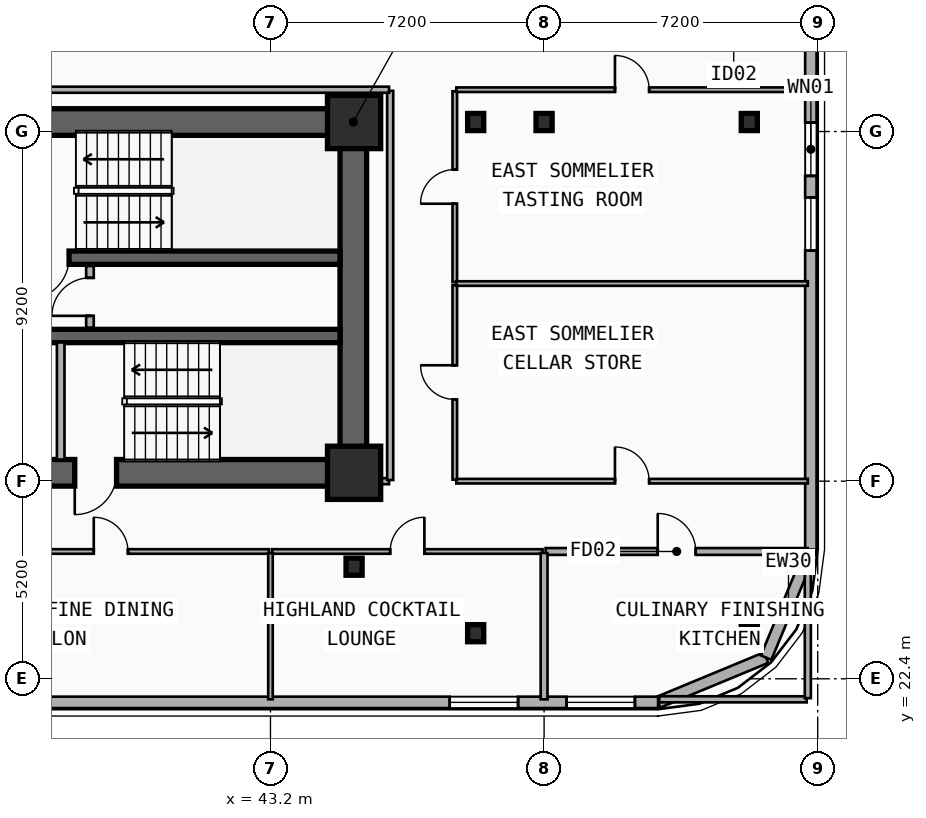
"""IFC4 building model, lengths in metres.
Left out: names, types, materials, properties, quantities, classifications, styles, units other than length and angle.
Written with IfcOpenShell. Run it as: python <this file> out.ifc"""

import sys

from ifc_helpers import new_model, si_unit, direction, frame, frame_2d, origin, origin_2d, place, context, subcontext, project, spatial, rectangle, i_section, extrude, element, fill, save


model = new_model("IFC4")
c1 = context("Model", 3, precision=1e-05, world=origin(), true_north=direction((0.0, 1.0)))
c2 = subcontext(c1, "Body", "Model", "MODEL_VIEW")
j1 = project(units=[si_unit("LENGTHUNIT", "METRE"), si_unit("PLANEANGLEUNIT", "RADIAN")], contexts=[c1])
p1 = place(None, origin())
s1 = spatial("IfcSite", under=j1, at=p1, CompositionType="ELEMENT")
p2 = place(p1, origin())
s2 = spatial("IfcBuilding", under=s1, at=p2, CompositionType="ELEMENT")
p3 = place(p2, frame((0.0, 0.0, 71.0)))
s3 = spatial("IfcBuildingStorey", under=s2, at=p3, CompositionType="ELEMENT", Elevation=71.0)
p4 = place(p3, frame((12.15, 37.05, 0.0), z_axis=(0.0, 0.0, 1.0), x_axis=(1.0, 0.0, 0.0)))
e1 = element("IfcWall", 1, at=p4, inside=s3, PredefinedType="SHEAR", context=c2, shape_type="SweptSolid", body=[
    extrude(rectangle(XDim=33.23, YDim=0.7, at=frame_2d((16.615, 0.0))), origin(), (0.0, 0.0, 1.0), 3.5),
])
p5 = place(p3, frame((45.38, 27.82, 0.0), z_axis=(0.0, 0.0, 1.0), x_axis=(-1.0, 0.0, 0.0)))
e2 = element("IfcWall", 2, at=p5, inside=s3, PredefinedType="SHEAR", context=c2, shape_type="SweptSolid", body=[
    extrude(rectangle(XDim=12.23, YDim=0.7, at=frame_2d((6.115, 0.0))), origin(), (0.0, 0.0, 1.0), 3.5),
])
p6 = place(p5, frame((9.93, 0.0, 0.0)))
e3 = element("IfcOpeningElement", 3, at=p6, cuts=e2, PredefinedType="OPENING", context=c2, shape_type="SweptSolid", body=[
    extrude(rectangle(XDim=1.1, YDim=2.15, at=frame_2d((0.55, 1.075))), frame((0.0, 0.36, 0.0), z_axis=(0.0, -1.0, 0.0), x_axis=(1.0, 0.0, 0.0)), (0.0, 0.0, 1.0), 0.72),
])
p7 = place(p5, frame((6.23, 0.0, 0.0)))
e4 = element("IfcOpeningElement", 4, at=p7, cuts=e2, PredefinedType="OPENING", context=c2, shape_type="SweptSolid", body=[
    extrude(rectangle(XDim=1.1, YDim=2.15, at=frame_2d((0.55, 1.075))), frame((0.0, 0.36, 0.0), z_axis=(0.0, -1.0, 0.0), x_axis=(1.0, 0.0, 0.0)), (0.0, 0.0, 1.0), 0.72),
])
p8 = place(p3, frame((45.38, 28.17, 0.0), z_axis=(0.0, 0.0, 1.0), x_axis=(0.0, 1.0, 0.0)))
e5 = element("IfcWall", 5, at=p8, inside=s3, PredefinedType="SHEAR", context=c2, shape_type="SweptSolid", body=[
    extrude(rectangle(XDim=8.53, YDim=0.7, at=frame_2d((4.265, 0.0))), origin(), (0.0, 0.0, 1.0), 3.5),
])
p9 = place(p3, frame((45.03, 33.48, 0.0), z_axis=(0.0, 0.0, 1.0), x_axis=(-1.0, 0.0, 0.0)))
e6 = element("IfcWall", 6, at=p9, inside=s3, PredefinedType="SHEAR", context=c2, shape_type="SweptSolid", body=[
    extrude(rectangle(XDim=8.475, YDim=0.35, at=frame_2d((4.238, 0.0))), origin(), (0.0, 0.0, 1.0), 3.5),
])
p10 = place(p9, frame((7.13, 0.0, 0.0)))
e7 = element("IfcOpeningElement", 7, at=p10, cuts=e6, PredefinedType="OPENING", context=c2, shape_type="SweptSolid", body=[
    extrude(rectangle(XDim=1.1, YDim=2.15, at=frame_2d((0.55, 1.075))), frame((0.0, 0.185, 0.0), z_axis=(0.0, -1.0, 0.0), x_axis=(1.0, 0.0, 0.0)), (0.0, 0.0, 1.0), 0.37),
])
p11 = place(p3, frame((36.555, 31.42, 0.0), z_axis=(0.0, 0.0, 1.0), x_axis=(1.0, 0.0, 0.0)))
e8 = element("IfcWall", 8, at=p11, inside=s3, PredefinedType="SHEAR", context=c2, shape_type="SweptSolid", body=[
    extrude(rectangle(XDim=8.475, YDim=0.35, at=frame_2d((4.238, 0.0))), origin(), (0.0, 0.0, 1.0), 3.5),
])
for number, where, z_axis, x_axis in (
    (9, (45.4, 27.82, 0.0), (0.0, 0.0, 1.0), (1.0, 0.0, 0.0)),
    (10, (45.4, 37.05, 0.0), (0.0, 0.0, 1.0), (1.0, 0.0, 0.0)),
):
    element("IfcColumn", number, at=place(p3, frame(where, z_axis=z_axis, x_axis=x_axis)), inside=s3, PredefinedType="COLUMN", context=c2, shape_type="SweptSolid", body=[
        extrude(rectangle(XDim=1.4, YDim=1.4, at=origin_2d()), origin(), (0.0, 0.0, 1.0), 3.5),
    ])
for number, where, z_axis, x_axis in (
    (11, (45.4, 25.35, 0.0), (0.0, 0.0, 1.0), (1.0, 0.0, 0.0)),
    (12, (48.6, 23.6, 0.0), (0.0, 0.0, 1.0), (1.0, 0.0, 0.0)),
    (13, (48.6, 37.05, 0.0), (0.0, 0.0, 1.0), (1.0, 0.0, 0.0)),
    (14, (50.4, 37.05, 0.0), (0.0, 0.0, 1.0), (1.0, 0.0, 0.0)),
    (15, (55.8, 23.6, 0.0), (0.0, 0.0, 1.0), (1.0, 0.0, 0.0)),
    (16, (55.8, 37.05, 0.0), (0.0, 0.0, 1.0), (1.0, 0.0, 0.0)),
):
    element("IfcColumn", number, at=place(p3, frame(where, z_axis=z_axis, x_axis=x_axis)), inside=s3, PredefinedType="COLUMN", context=c2, shape_type="SweptSolid", body=[
        extrude(i_section(OverallWidth=0.424, OverallDepth=0.45, WebThickness=0.041, FlangeThickness=0.065, FilletRadius=0.015, at=origin_2d()), origin(), (0.0, 0.0, 1.0), 3.5),
    ])
p12 = place(p3, frame((56.243, 22.958, 0.0), z_axis=(0.0, 0.0, 1.0), x_axis=(-0.923882414032, -0.382676475685, 0.0)))
e17 = element("IfcWall", 17, at=p12, inside=s3, PredefinedType="SOLIDWALL", context=c2, shape_type="SweptSolid", body=[
    extrude(rectangle(XDim=3.077, YDim=0.3, at=frame_2d((1.539, 0.0))), origin(), (0.0, 0.0, 1.0), 2.66),
])
p13 = place(p3, frame((57.42, 25.8, 0.0), z_axis=(0.0, 0.0, 1.0), x_axis=(-0.382636798336, -0.92389884758, 0.0)))
e18 = element("IfcWall", 18, at=p13, inside=s3, PredefinedType="SOLIDWALL", context=c2, shape_type="SweptSolid", body=[
    extrude(rectangle(XDim=3.077, YDim=0.3, at=frame_2d((1.538, 0.0))), origin(), (0.0, 0.0, 1.0), 3.18),
])
p14 = place(p3, frame((57.42, 41.0, 0.0), z_axis=(0.0, 0.0, 1.0), x_axis=(0.0, -1.0, 0.0)))
e19 = element("IfcWall", 19, at=p14, inside=s3, PredefinedType="SOLIDWALL", context=c2, shape_type="SweptSolid", body=[
    extrude(rectangle(XDim=15.2, YDim=0.3, at=frame_2d((7.6, 0.0))), origin(), (0.0, 0.0, 1.0), 3.18),
])
p15 = place(p14, frame((3.967, 0.0, 0.48)))
e20 = element("IfcOpeningElement", 20, at=p15, cuts=e19, PredefinedType="OPENING", context=c2, shape_type="SweptSolid", body=[
    extrude(rectangle(XDim=1.4, YDim=1.8, at=frame_2d((0.7, 0.9))), frame((0.0, 0.16, 0.0), z_axis=(0.0, -1.0, 0.0), x_axis=(1.0, 0.0, 0.0)), (0.0, 0.0, 1.0), 0.32),
])
p16 = place(p14, frame((5.933, 0.0, 0.48)))
e21 = element("IfcOpeningElement", 21, at=p16, cuts=e19, PredefinedType="OPENING", context=c2, shape_type="SweptSolid", body=[
    extrude(rectangle(XDim=1.4, YDim=1.8, at=frame_2d((0.7, 0.9))), frame((0.0, 0.16, 0.0), z_axis=(0.0, -1.0, 0.0), x_axis=(1.0, 0.0, 0.0)), (0.0, 0.0, 1.0), 0.32),
])
p17 = place(p3, frame((53.4, 21.78, 0.0), z_axis=(0.0, 0.0, 1.0), x_axis=(-1.0, 0.0, 0.0)))
e22 = element("IfcWall", 22, at=p17, inside=s3, PredefinedType="SOLIDWALL", context=c2, shape_type="SweptSolid", body=[
    extrude(rectangle(XDim=49.2, YDim=0.3, at=frame_2d((24.6, 0.0))), origin(), (0.0, 0.0, 1.0), 2.66),
])
p18 = place(p17, frame((47.08, 0.0, 0.68)))
e23 = element("IfcOpeningElement", 23, at=p18, cuts=e22, PredefinedType="OPENING", context=c2, shape_type="SweptSolid", body=[
    extrude(rectangle(XDim=1.8, YDim=1.8, at=frame_2d((0.9, 0.9))), frame((0.0, 0.16, 0.0), z_axis=(0.0, -1.0, 0.0), x_axis=(1.0, 0.0, 0.0)), (0.0, 0.0, 1.0), 0.32),
])
p19 = place(p17, frame((42.3, 0.0, 0.68)))
e24 = element("IfcOpeningElement", 24, at=p19, cuts=e22, PredefinedType="OPENING", context=c2, shape_type="SweptSolid", body=[
    extrude(rectangle(XDim=1.8, YDim=1.8, at=frame_2d((0.9, 0.9))), frame((0.0, 0.16, 0.0), z_axis=(0.0, -1.0, 0.0), x_axis=(1.0, 0.0, 0.0)), (0.0, 0.0, 1.0), 0.32),
])
p20 = place(p17, frame((30.9, 0.0, 0.48)))
e25 = element("IfcOpeningElement", 25, at=p20, cuts=e22, PredefinedType="OPENING", context=c2, shape_type="SweptSolid", body=[
    extrude(rectangle(XDim=1.2, YDim=1.5, at=frame_2d((0.6, 0.75))), frame((0.0, 0.16, 0.0), z_axis=(0.0, -1.0, 0.0), x_axis=(1.0, 0.0, 0.0)), (0.0, 0.0, 1.0), 0.32),
])
p21 = place(p17, frame((17.1, 0.0, 0.48)))
e26 = element("IfcOpeningElement", 26, at=p21, cuts=e22, PredefinedType="OPENING", context=c2, shape_type="SweptSolid", body=[
    extrude(rectangle(XDim=1.2, YDim=1.5, at=frame_2d((0.6, 0.75))), frame((0.0, 0.16, 0.0), z_axis=(0.0, -1.0, 0.0), x_axis=(1.0, 0.0, 0.0)), (0.0, 0.0, 1.0), 0.32),
])
p22 = place(p17, frame((3.684, 0.0, 0.68)))
e27 = element("IfcOpeningElement", 27, at=p22, cuts=e22, PredefinedType="OPENING", context=c2, shape_type="SweptSolid", body=[
    extrude(rectangle(XDim=1.8, YDim=1.8, at=frame_2d((0.9, 0.9))), frame((0.0, 0.16, 0.0), z_axis=(0.0, -1.0, 0.0), x_axis=(1.0, 0.0, 0.0)), (0.0, 0.0, 1.0), 0.32),
])
p23 = place(p17, frame((0.61, 0.0, 0.68)))
e28 = element("IfcOpeningElement", 28, at=p23, cuts=e22, PredefinedType="OPENING", context=c2, shape_type="SweptSolid", body=[
    extrude(rectangle(XDim=1.8, YDim=1.8, at=frame_2d((0.9, 0.9))), frame((0.0, 0.16, 0.0), z_axis=(0.0, -1.0, 0.0), x_axis=(1.0, 0.0, 0.0)), (0.0, 0.0, 1.0), 0.32),
])
p24 = place(p3, frame((37.68, 28.17, 0.0), z_axis=(0.0, 0.0, 1.0), x_axis=(0.0, 1.0, 0.0)))
e29 = element("IfcWall", 29, at=p24, inside=s3, PredefinedType="PARTITIONING", context=c2, shape_type="SweptSolid", body=[
    extrude(rectangle(XDim=3.08, YDim=0.2, at=frame_2d((1.54, 0.0))), origin(), (0.0, 0.0, 1.0), 2.56),
])
p25 = place(p3, frame((38.45, 31.64, 0.0), z_axis=(0.0, 0.0, 1.0), x_axis=(0.0, 1.0, 0.0)))
e30 = element("IfcWall", 30, at=p25, inside=s3, PredefinedType="PARTITIONING", context=c2, shape_type="SweptSolid", body=[
    extrude(rectangle(XDim=1.62, YDim=0.2, at=frame_2d((0.81, 0.0))), origin(), (0.0, 0.0, 1.0), 3.18),
])
p26 = place(p25, frame((0.31, 0.0, 0.0)))
e31 = element("IfcOpeningElement", 31, at=p26, cuts=e30, PredefinedType="OPENING", context=c2, shape_type="SweptSolid", body=[
    extrude(rectangle(XDim=1.0, YDim=2.15, at=frame_2d((0.5, 1.075))), frame((0.0, 0.11, 0.0), z_axis=(0.0, -1.0, 0.0), x_axis=(1.0, 0.0, 0.0)), (0.0, 0.0, 1.0), 0.22),
])
p27 = place(p3, frame((48.09, 27.6, 0.0), z_axis=(0.0, 0.0, 1.0), x_axis=(1.0, 0.0, 0.0)))
e32 = element("IfcWall", 32, at=p27, inside=s3, PredefinedType="PARTITIONING", context=c2, shape_type="SweptSolid", body=[
    extrude(rectangle(XDim=9.25, YDim=0.12, at=frame_2d((4.625, 0.0))), origin(), (0.0, 0.0, 1.0), 2.51),
])
p28 = place(p27, frame((4.175, 0.0, 0.0)))
e33 = element("IfcOpeningElement", 33, at=p28, cuts=e32, PredefinedType="OPENING", context=c2, shape_type="SweptSolid", body=[
    extrude(rectangle(XDim=0.9, YDim=2.1, at=frame_2d((0.45, 1.05))), frame((0.0, 0.07, 0.0), z_axis=(0.0, -1.0, 0.0), x_axis=(1.0, 0.0, 0.0)), (0.0, 0.0, 1.0), 0.14),
])
p29 = place(p3, frame((34.84, 25.75, 0.0), z_axis=(0.0, 0.0, 1.0), x_axis=(1.0, 0.0, 0.0)))
e34 = element("IfcWall", 34, at=p29, inside=s3, PredefinedType="PARTITIONING", context=c2, shape_type="SweptSolid", body=[
    extrude(rectangle(XDim=8.32, YDim=0.12, at=frame_2d((4.16, 0.0))), origin(), (0.0, 0.0, 1.0), 2.25),
])
p30 = place(p29, frame((3.71, 0.0, 0.0)))
e35 = element("IfcOpeningElement", 35, at=p30, cuts=e34, PredefinedType="OPENING", context=c2, shape_type="SweptSolid", body=[
    extrude(rectangle(XDim=0.9, YDim=2.1, at=frame_2d((0.45, 1.05))), frame((0.0, 0.07, 0.0), z_axis=(0.0, -1.0, 0.0), x_axis=(1.0, 0.0, 0.0)), (0.0, 0.0, 1.0), 0.14),
])
p31 = place(p3, frame((43.24, 25.75, 0.0), z_axis=(0.0, 0.0, 1.0), x_axis=(1.0, 0.0, 0.0)))
e36 = element("IfcWall", 36, at=p31, inside=s3, PredefinedType="PARTITIONING", context=c2, shape_type="SweptSolid", body=[
    extrude(rectangle(XDim=7.12, YDim=0.12, at=frame_2d((3.56, 0.0))), origin(), (0.0, 0.0, 1.0), 2.25),
])
p32 = place(p31, frame((3.11, 0.0, 0.0)))
e37 = element("IfcOpeningElement", 37, at=p32, cuts=e36, PredefinedType="OPENING", context=c2, shape_type="SweptSolid", body=[
    extrude(rectangle(XDim=0.9, YDim=2.1, at=frame_2d((0.45, 1.05))), frame((0.0, 0.07, 0.0), z_axis=(0.0, -1.0, 0.0), x_axis=(1.0, 0.0, 0.0)), (0.0, 0.0, 1.0), 0.14),
])
p33 = place(p3, frame((50.44, 25.75, 0.0), z_axis=(0.0, 0.0, 1.0), x_axis=(1.0, 0.0, 0.0)))
e38 = element("IfcWall", 38, at=p33, inside=s3, PredefinedType="PLUMBINGWALL", context=c2, shape_type="SweptSolid", body=[
    extrude(rectangle(XDim=6.9, YDim=0.18, at=frame_2d((3.45, 0.0))), origin(), (0.0, 0.0, 1.0), 2.51),
])
p34 = place(p33, frame((2.95, 0.0, 0.0)))
e39 = element("IfcOpeningElement", 39, at=p34, cuts=e38, PredefinedType="OPENING", context=c2, shape_type="SweptSolid", body=[
    extrude(rectangle(XDim=1.0, YDim=2.15, at=frame_2d((0.5, 1.075))), frame((0.0, 0.1, 0.0), z_axis=(0.0, -1.0, 0.0), x_axis=(1.0, 0.0, 0.0)), (0.0, 0.0, 1.0), 0.2),
])
p35 = place(p3, frame((48.05, 27.64, 0.0), z_axis=(0.0, 0.0, 1.0), x_axis=(0.0, 1.0, 0.0)))
e40 = element("IfcWall", 40, at=p35, inside=s3, PredefinedType="PARTITIONING", context=c2, shape_type="SweptSolid", body=[
    extrude(rectangle(XDim=5.12, YDim=0.12, at=frame_2d((2.56, 0.0))), origin(), (0.0, 0.0, 1.0), 3.18),
])
p36 = place(p35, frame((2.11, 0.0, 0.0)))
e41 = element("IfcOpeningElement", 41, at=p36, cuts=e40, PredefinedType="OPENING", context=c2, shape_type="SweptSolid", body=[
    extrude(rectangle(XDim=0.9, YDim=2.1, at=frame_2d((0.45, 1.05))), frame((0.0, 0.07, 0.0), z_axis=(0.0, -1.0, 0.0), x_axis=(1.0, 0.0, 0.0)), (0.0, 0.0, 1.0), 0.14),
])
p37 = place(p3, frame((48.05, 32.84, 0.0), z_axis=(0.0, 0.0, 1.0), x_axis=(0.0, 1.0, 0.0)))
e42 = element("IfcWall", 42, at=p37, inside=s3, PredefinedType="PARTITIONING", context=c2, shape_type="SweptSolid", body=[
    extrude(rectangle(XDim=5.02, YDim=0.12, at=frame_2d((2.51, 0.0))), origin(), (0.0, 0.0, 1.0), 2.66),
])
p38 = place(p37, frame((2.06, 0.0, 0.0)))
e43 = element("IfcOpeningElement", 43, at=p38, cuts=e42, PredefinedType="OPENING", context=c2, shape_type="SweptSolid", body=[
    extrude(rectangle(XDim=0.9, YDim=2.1, at=frame_2d((0.45, 1.05))), frame((0.0, 0.07, 0.0), z_axis=(0.0, -1.0, 0.0), x_axis=(1.0, 0.0, 0.0)), (0.0, 0.0, 1.0), 0.14),
])
p39 = place(p3, frame((48.09, 37.9, 0.0), z_axis=(0.0, 0.0, 1.0), x_axis=(1.0, 0.0, 0.0)))
e44 = element("IfcWall", 44, at=p39, inside=s3, PredefinedType="PARTITIONING", context=c2, shape_type="SweptSolid", body=[
    extrude(rectangle(XDim=9.25, YDim=0.12, at=frame_2d((4.625, 0.0))), origin(), (0.0, 0.0, 1.0), 3.18),
])
p40 = place(p39, frame((4.175, 0.0, 0.0)))
e45 = element("IfcOpeningElement", 45, at=p40, cuts=e44, PredefinedType="OPENING", context=c2, shape_type="SweptSolid", body=[
    extrude(rectangle(XDim=0.9, YDim=2.1, at=frame_2d((0.45, 1.05))), frame((0.0, 0.07, 0.0), z_axis=(0.0, -1.0, 0.0), x_axis=(1.0, 0.0, 0.0)), (0.0, 0.0, 1.0), 0.14),
])
p41 = place(p3, frame((48.09, 32.8, 0.0), z_axis=(0.0, 0.0, 1.0), x_axis=(1.0, 0.0, 0.0)))
e46 = element("IfcWall", 46, at=p41, inside=s3, PredefinedType="PARTITIONING", context=c2, shape_type="SweptSolid", body=[
    extrude(rectangle(XDim=9.25, YDim=0.12, at=frame_2d((4.625, 0.0))), origin(), (0.0, 0.0, 1.0), 2.51),
])
p42 = place(p3, frame((43.2, 21.86, 0.0), z_axis=(0.0, 0.0, 1.0), x_axis=(0.0, 1.0, 0.0)))
e47 = element("IfcWall", 47, at=p42, inside=s3, PredefinedType="PARTITIONING", context=c2, shape_type="SweptSolid", body=[
    extrude(rectangle(XDim=3.85, YDim=0.12, at=frame_2d((1.925, 0.0))), origin(), (0.0, 0.0, 1.0), 2.72),
])
p43 = place(p3, frame((50.4, 21.86, 0.0), z_axis=(0.0, 0.0, 1.0), x_axis=(0.0, 1.0, 0.0)))
e48 = element("IfcWall", 48, at=p43, inside=s3, PredefinedType="PLUMBINGWALL", context=c2, shape_type="SweptSolid", body=[
    extrude(rectangle(XDim=3.85, YDim=0.18, at=frame_2d((1.925, 0.0))), origin(), (0.0, 0.0, 1.0), 2.51),
])
p44 = place(p3, frame((45.41, 27.6, 0.0), z_axis=(0.0, 0.0, 1.0), x_axis=(1.0, 0.0, 0.0)))
e49 = element("IfcWall", 49, at=p44, inside=s3, PredefinedType="PARTITIONING", context=c2, shape_type="SweptSolid", body=[
    extrude(rectangle(XDim=0.91, YDim=0.16, at=frame_2d((0.455, 0.0))), origin(), (0.0, 0.0, 1.0), 2.28),
])
p45 = place(p3, frame((46.35, 27.63, 0.0), z_axis=(0.0, 0.0, 1.0), x_axis=(0.0, 1.0, 0.0)))
e50 = element("IfcWall", 50, at=p45, inside=s3, PredefinedType="PARTITIONING", context=c2, shape_type="SweptSolid", body=[
    extrude(rectangle(XDim=10.24, YDim=0.16, at=frame_2d((5.12, 0.0))), origin(), (0.0, 0.0, 1.0), 2.66),
])
p46 = place(p3, frame((11.28, 37.9, 0.0), z_axis=(0.0, 0.0, 1.0), x_axis=(1.0, 0.0, 0.0)))
e51 = element("IfcWall", 51, at=p46, inside=s3, PredefinedType="PARTITIONING", context=c2, shape_type="SweptSolid", body=[
    extrude(rectangle(XDim=35.04, YDim=0.16, at=frame_2d((17.52, 0.0))), origin(), (0.0, 0.0, 1.0), 3.18),
])
p47 = place(p3, frame((53.43, 21.86, 0.0), z_axis=(0.0, 0.0, 1.0), x_axis=(1.0, 0.0, 0.0)))
e52 = element("IfcWall", 52, at=p47, inside=s3, PredefinedType="PARTITIONING", context=c2, shape_type="SweptSolid", body=[
    extrude(rectangle(XDim=3.88, YDim=0.16, at=frame_2d((1.94, 0.0))), origin(), (0.0, 0.0, 1.0), 2.66),
])
p48 = place(p3, frame((57.34, 21.89, 0.0), z_axis=(0.0, 0.0, 1.0), x_axis=(0.0, 1.0, 0.0)))
e53 = element("IfcWall", 53, at=p48, inside=s3, PredefinedType="PARTITIONING", context=c2, shape_type="SweptSolid", body=[
    extrude(rectangle(XDim=3.83, YDim=0.16, at=frame_2d((1.915, 0.0))), origin(), (0.0, 0.0, 1.0), 3.18),
])
p49 = place(p15, origin())
e54 = element("IfcWindow", 54, at=p49, inside=s3, PartitioningType="SINGLE_PANEL", PredefinedType="WINDOW", context=c2, shape_type="SweptSolid", body=[
    extrude(rectangle(XDim=1.4, YDim=1.8, at=frame_2d((0.7, 0.9))), frame((0.0, 0.03, 0.0), z_axis=(0.0, -1.0, 0.0), x_axis=(1.0, 0.0, 0.0)), (0.0, 0.0, 1.0), 0.06),
])
fill(e20, e54)
p50 = place(p16, origin())
e55 = element("IfcWindow", 55, at=p50, inside=s3, PartitioningType="SINGLE_PANEL", PredefinedType="WINDOW", context=c2, shape_type="SweptSolid", body=[
    extrude(rectangle(XDim=1.4, YDim=1.8, at=frame_2d((0.7, 0.9))), frame((0.0, 0.03, 0.0), z_axis=(0.0, -1.0, 0.0), x_axis=(1.0, 0.0, 0.0)), (0.0, 0.0, 1.0), 0.06),
])
fill(e21, e55)
p51 = place(p22, origin())
e56 = element("IfcWindow", 56, at=p51, inside=s3, PartitioningType="SINGLE_PANEL", PredefinedType="WINDOW", context=c2, shape_type="SweptSolid", body=[
    extrude(rectangle(XDim=1.8, YDim=1.8, at=frame_2d((0.9, 0.9))), frame((0.0, 0.03, 0.0), z_axis=(0.0, -1.0, 0.0), x_axis=(1.0, 0.0, 0.0)), (0.0, 0.0, 1.0), 0.06),
])
fill(e27, e56)
p52 = place(p23, origin())
e57 = element("IfcWindow", 57, at=p52, inside=s3, PartitioningType="SINGLE_PANEL", PredefinedType="WINDOW", context=c2, shape_type="SweptSolid", body=[
    extrude(rectangle(XDim=1.8, YDim=1.8, at=frame_2d((0.9, 0.9))), frame((0.0, 0.03, 0.0), z_axis=(0.0, -1.0, 0.0), x_axis=(1.0, 0.0, 0.0)), (0.0, 0.0, 1.0), 0.06),
])
fill(e28, e57)
p53 = place(p10, origin())
e58 = element("IfcDoor", 58, at=p53, inside=s3, OperationType="SINGLE_SWING_RIGHT", PredefinedType="DOOR", context=c2, shape_type="SweptSolid", body=[
    extrude(rectangle(XDim=1.1, YDim=2.15, at=frame_2d((0.55, 1.075))), frame((0.0, 0.025, 0.0), z_axis=(0.0, -1.0, 0.0), x_axis=(1.0, 0.0, 0.0)), (0.0, 0.0, 1.0), 0.05),
])
fill(e7, e58)
p54 = place(p7, origin())
e59 = element("IfcDoor", 59, at=p54, inside=s3, OperationType="SINGLE_SWING_RIGHT", PredefinedType="DOOR", context=c2, shape_type="SweptSolid", body=[
    extrude(rectangle(XDim=1.1, YDim=2.15, at=frame_2d((0.55, 1.075))), frame((0.0, 0.025, 0.0), z_axis=(0.0, -1.0, 0.0), x_axis=(1.0, 0.0, 0.0)), (0.0, 0.0, 1.0), 0.05),
])
fill(e4, e59)
p55 = place(p26, origin())
e60 = element("IfcDoor", 60, at=p55, inside=s3, OperationType="SINGLE_SWING_LEFT", PredefinedType="DOOR", context=c2, shape_type="SweptSolid", body=[
    extrude(rectangle(XDim=1.0, YDim=2.15, at=frame_2d((0.5, 1.075))), frame((0.0, 0.025, 0.0), z_axis=(0.0, -1.0, 0.0), x_axis=(1.0, 0.0, 0.0)), (0.0, 0.0, 1.0), 0.05),
])
fill(e31, e60)
p56 = place(p28, origin())
e61 = element("IfcDoor", 61, at=p56, inside=s3, OperationType="SINGLE_SWING_LEFT", PredefinedType="DOOR", context=c2, shape_type="SweptSolid", body=[
    extrude(rectangle(XDim=0.9, YDim=2.1, at=frame_2d((0.45, 1.05))), frame((0.0, 0.025, 0.0), z_axis=(0.0, -1.0, 0.0), x_axis=(1.0, 0.0, 0.0)), (0.0, 0.0, 1.0), 0.05),
])
fill(e33, e61)
p57 = place(p30, origin())
e62 = element("IfcDoor", 62, at=p57, inside=s3, OperationType="SINGLE_SWING_LEFT", PredefinedType="DOOR", context=c2, shape_type="SweptSolid", body=[
    extrude(rectangle(XDim=0.9, YDim=2.1, at=frame_2d((0.45, 1.05))), frame((0.0, 0.025, 0.0), z_axis=(0.0, -1.0, 0.0), x_axis=(1.0, 0.0, 0.0)), (0.0, 0.0, 1.0), 0.05),
])
fill(e35, e62)
p58 = place(p32, origin())
e63 = element("IfcDoor", 63, at=p58, inside=s3, OperationType="SINGLE_SWING_RIGHT", PredefinedType="DOOR", context=c2, shape_type="SweptSolid", body=[
    extrude(rectangle(XDim=0.9, YDim=2.1, at=frame_2d((0.45, 1.05))), frame((0.0, 0.025, 0.0), z_axis=(0.0, -1.0, 0.0), x_axis=(1.0, 0.0, 0.0)), (0.0, 0.0, 1.0), 0.05),
])
fill(e37, e63)
p59 = place(p34, origin())
e64 = element("IfcDoor", 64, at=p59, inside=s3, OperationType="SINGLE_SWING_LEFT", PredefinedType="DOOR", context=c2, shape_type="SweptSolid", body=[
    extrude(rectangle(XDim=1.0, YDim=2.15, at=frame_2d((0.5, 1.075))), frame((0.0, 0.025, 0.0), z_axis=(0.0, -1.0, 0.0), x_axis=(1.0, 0.0, 0.0)), (0.0, 0.0, 1.0), 0.05),
])
fill(e39, e64)
p60 = place(p36, origin())
e65 = element("IfcDoor", 65, at=p60, inside=s3, OperationType="SINGLE_SWING_RIGHT", PredefinedType="DOOR", context=c2, shape_type="SweptSolid", body=[
    extrude(rectangle(XDim=0.9, YDim=2.1, at=frame_2d((0.45, 1.05))), frame((0.0, 0.025, 0.0), z_axis=(0.0, -1.0, 0.0), x_axis=(1.0, 0.0, 0.0)), (0.0, 0.0, 1.0), 0.05),
])
fill(e41, e65)
p61 = place(p38, origin())
e66 = element("IfcDoor", 66, at=p61, inside=s3, OperationType="SINGLE_SWING_LEFT", PredefinedType="DOOR", context=c2, shape_type="SweptSolid", body=[
    extrude(rectangle(XDim=0.9, YDim=2.1, at=frame_2d((0.45, 1.05))), frame((0.0, 0.025, 0.0), z_axis=(0.0, -1.0, 0.0), x_axis=(1.0, 0.0, 0.0)), (0.0, 0.0, 1.0), 0.05),
])
fill(e43, e66)
p62 = place(p40, origin())
e67 = element("IfcDoor", 67, at=p62, inside=s3, OperationType="SINGLE_SWING_LEFT", PredefinedType="DOOR", context=c2, shape_type="SweptSolid", body=[
    extrude(rectangle(XDim=0.9, YDim=2.1, at=frame_2d((0.45, 1.05))), frame((0.0, 0.025, 0.0), z_axis=(0.0, -1.0, 0.0), x_axis=(1.0, 0.0, 0.0)), (0.0, 0.0, 1.0), 0.05),
])
fill(e45, e67)
save(model, sys.argv[1])
